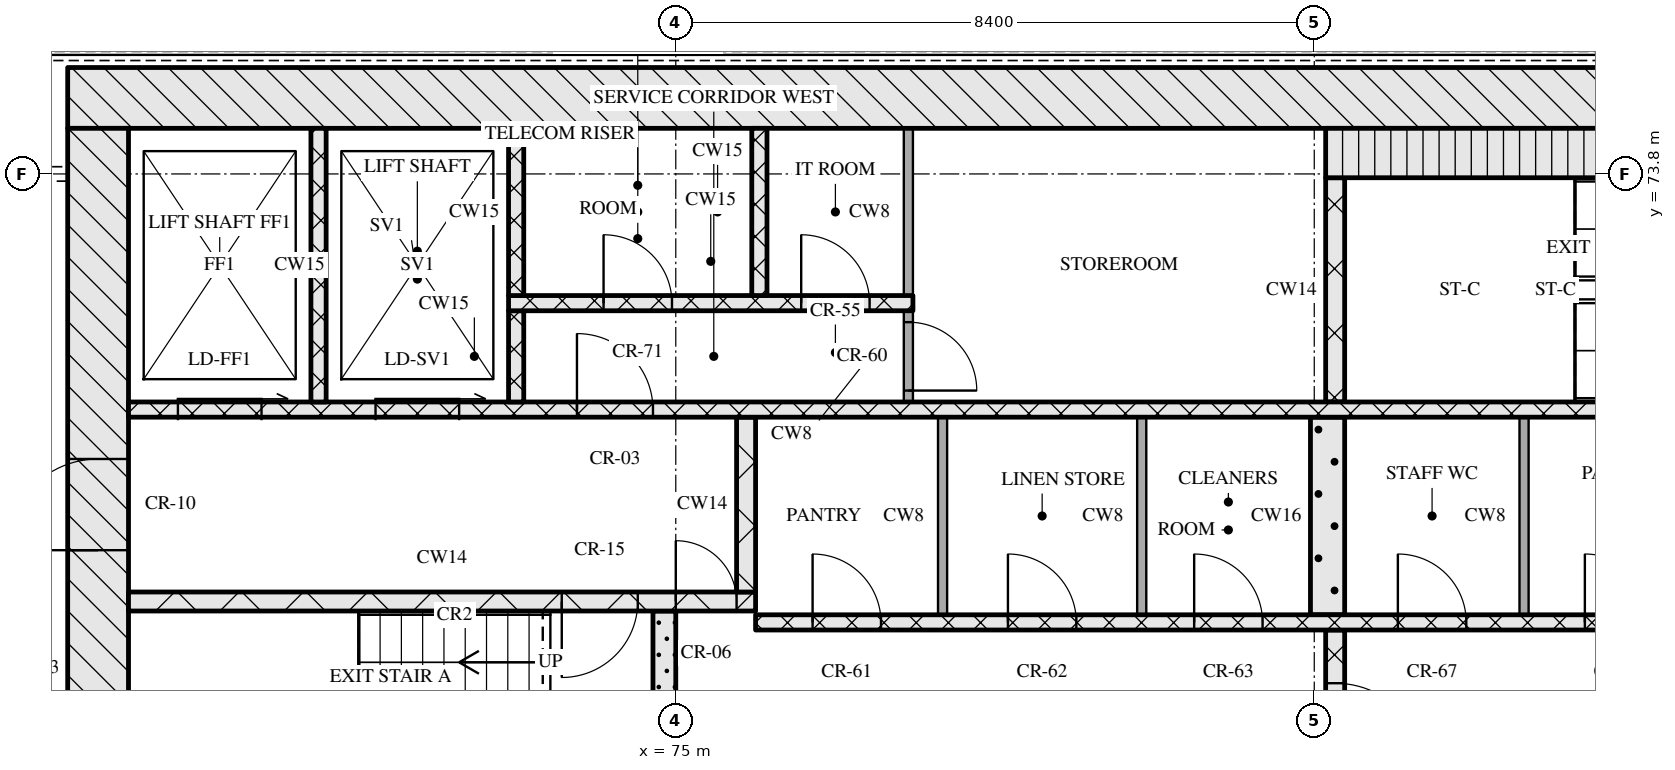
"""IFC4 building model, lengths in metres.
Left out: names, types, materials, properties, quantities, classifications, styles, units other than length and angle.
Written with IfcOpenShell. Run it as: python <this file> out.ifc"""

import sys

from ifc_helpers import new_model, si_unit, direction, frame, frame_2d, origin, place, context, subcontext, project, spatial, rectangle, extrude, element, fill, save


model = new_model("IFC4")
c1 = context("Model", 3, precision=1e-05, world=origin(), true_north=direction((0.0, 1.0)))
c2 = subcontext(c1, "Body", "Model", "MODEL_VIEW")
j1 = project(units=[si_unit("LENGTHUNIT", "METRE"), si_unit("PLANEANGLEUNIT", "RADIAN")], contexts=[c1])
p1 = place(None, origin())
s1 = spatial("IfcSite", under=j1, at=p1, CompositionType="ELEMENT")
p2 = place(p1, origin())
s2 = spatial("IfcBuilding", under=s1, at=p2, CompositionType="ELEMENT")
p3 = place(p2, frame((0.0, 0.0, 183.45)))
s3 = spatial("IfcBuildingStorey", under=s2, at=p3, CompositionType="ELEMENT", Elevation=183.45)
p4 = place(p3, frame((67.0, 74.8, 0.0), z_axis=(0.0, 0.0, 1.0), x_axis=(1.0, 0.0, 0.0)))
e1 = element("IfcWall", 1, at=p4, inside=s3, PredefinedType="SOLIDWALL", context=c2, shape_type="SweptSolid", body=[
    extrude(rectangle(XDim=41.2, YDim=0.8, at=frame_2d((20.6, 0.0))), origin(), (0.0, 0.0, 1.0), 3.32),
])
p5 = place(p3, frame((67.4, 62.4, 0.0), z_axis=(0.0, 0.0, 1.0), x_axis=(0.0, 1.0, 0.0)))
e2 = element("IfcWall", 2, at=p5, inside=s3, PredefinedType="SOLIDWALL", context=c2, shape_type="SweptSolid", body=[
    extrude(rectangle(XDim=12.0, YDim=0.8, at=frame_2d((6.0, 0.0))), origin(), (0.0, 0.0, 1.0), 3.32),
])
p6 = place(p5, frame((6.45, 0.0, 0.0)))
e3 = element("IfcOpeningElement", 3, at=p6, cuts=e2, PredefinedType="OPENING", context=c2, shape_type="SweptSolid", body=[
    extrude(rectangle(XDim=1.2, YDim=2.1, at=frame_2d((0.6, 1.05))), frame((0.0, 0.41, 0.0), z_axis=(0.0, -1.0, 0.0), x_axis=(1.0, 0.0, 0.0)), (0.0, 0.0, 1.0), 0.82),
])
p7 = place(p3, frame((74.85, 65.2, 0.0), z_axis=(0.0, 0.0, 1.0), x_axis=(0.0, 1.0, 0.0)))
e4 = element("IfcWall", 4, at=p7, inside=s3, PredefinedType="SOLIDWALL", context=c2, shape_type="SweptSolid", body=[
    extrude(rectangle(XDim=2.85, YDim=0.3, at=frame_2d((1.425, 0.0))), origin(), (0.0, 0.0, 1.0), 3.32),
])
p8 = place(p3, frame((83.675, 65.2, 0.0), z_axis=(0.0, 0.0, 1.0), x_axis=(0.0, 1.0, 0.0)))
e5 = element("IfcWall", 5, at=p8, inside=s3, PredefinedType="SOLIDWALL", context=c2, shape_type="SweptSolid", body=[
    extrude(rectangle(XDim=2.6, YDim=0.25, at=frame_2d((1.3, 0.0))), origin(), (0.0, 0.0, 1.0), 3.32),
])
p9 = place(p8, frame((0.7, 0.0, 0.0)))
e6 = element("IfcOpeningElement", 6, at=p9, cuts=e5, PredefinedType="OPENING", context=c2, shape_type="SweptSolid", body=[
    extrude(rectangle(XDim=1.2, YDim=2.1, at=frame_2d((0.6, 1.05))), frame((0.0, 0.135, 0.0), z_axis=(0.0, -1.0, 0.0), x_axis=(1.0, 0.0, 0.0)), (0.0, 0.0, 1.0), 0.27),
])
p10 = place(p3, frame((76.05, 67.9, 0.0), z_axis=(0.0, 0.0, 1.0), x_axis=(1.0, 0.0, 0.0)))
e7 = element("IfcWall", 7, at=p10, inside=s3, PredefinedType="SOLIDWALL", context=c2, shape_type="SweptSolid", body=[
    extrude(rectangle(XDim=23.1, YDim=0.2, at=frame_2d((11.55, 0.0))), origin(), (0.0, 0.0, 1.0), 3.32),
])
p11 = place(p10, frame((0.75, 0.0, 0.0)))
e8 = element("IfcOpeningElement", 8, at=p11, cuts=e7, PredefinedType="OPENING", context=c2, shape_type="SweptSolid", body=[
    extrude(rectangle(XDim=0.9, YDim=2.1, at=frame_2d((0.45, 1.05))), frame((0.0, 0.11, 0.0), z_axis=(0.0, -1.0, 0.0), x_axis=(1.0, 0.0, 0.0)), (0.0, 0.0, 1.0), 0.22),
])
p12 = place(p10, frame((3.32, 0.0, 0.0)))
e9 = element("IfcOpeningElement", 9, at=p12, cuts=e7, PredefinedType="OPENING", context=c2, shape_type="SweptSolid", body=[
    extrude(rectangle(XDim=0.9, YDim=2.1, at=frame_2d((0.45, 1.05))), frame((0.0, 0.11, 0.0), z_axis=(0.0, -1.0, 0.0), x_axis=(1.0, 0.0, 0.0)), (0.0, 0.0, 1.0), 0.22),
])
p13 = place(p10, frame((5.77, 0.0, 0.0)))
e10 = element("IfcOpeningElement", 10, at=p13, cuts=e7, PredefinedType="OPENING", context=c2, shape_type="SweptSolid", body=[
    extrude(rectangle(XDim=0.9, YDim=2.1, at=frame_2d((0.45, 1.05))), frame((0.0, 0.11, 0.0), z_axis=(0.0, -1.0, 0.0), x_axis=(1.0, 0.0, 0.0)), (0.0, 0.0, 1.0), 0.22),
])
p14 = place(p10, frame((8.45, 0.0, 0.0)))
e11 = element("IfcOpeningElement", 11, at=p14, cuts=e7, PredefinedType="OPENING", context=c2, shape_type="SweptSolid", body=[
    extrude(rectangle(XDim=0.9, YDim=2.1, at=frame_2d((0.45, 1.05))), frame((0.0, 0.11, 0.0), z_axis=(0.0, -1.0, 0.0), x_axis=(1.0, 0.0, 0.0)), (0.0, 0.0, 1.0), 0.22),
])
p15 = place(p10, frame((10.91, 0.0, 0.0)))
e12 = element("IfcOpeningElement", 12, at=p15, cuts=e7, PredefinedType="OPENING", context=c2, shape_type="SweptSolid", body=[
    extrude(rectangle(XDim=0.9, YDim=2.1, at=frame_2d((0.45, 1.05))), frame((0.0, 0.11, 0.0), z_axis=(0.0, -1.0, 0.0), x_axis=(1.0, 0.0, 0.0)), (0.0, 0.0, 1.0), 0.22),
])
p16 = place(p10, frame((13.55, 0.0, 0.0)))
e13 = element("IfcOpeningElement", 13, at=p16, cuts=e7, PredefinedType="OPENING", context=c2, shape_type="SweptSolid", body=[
    extrude(rectangle(XDim=1.0, YDim=2.1, at=frame_2d((0.5, 1.05))), frame((0.0, 0.11, 0.0), z_axis=(0.0, -1.0, 0.0), x_axis=(1.0, 0.0, 0.0)), (0.0, 0.0, 1.0), 0.22),
])
p17 = place(p10, frame((16.2, 0.0, 0.0)))
e14 = element("IfcOpeningElement", 14, at=p17, cuts=e7, PredefinedType="OPENING", context=c2, shape_type="SweptSolid", body=[
    extrude(rectangle(XDim=1.1, YDim=2.1, at=frame_2d((0.55, 1.05))), frame((0.0, 0.11, 0.0), z_axis=(0.0, -1.0, 0.0), x_axis=(1.0, 0.0, 0.0)), (0.0, 0.0, 1.0), 0.22),
])
p18 = place(p10, frame((18.7, 0.0, 0.0)))
e15 = element("IfcOpeningElement", 15, at=p18, cuts=e7, PredefinedType="OPENING", context=c2, shape_type="SweptSolid", body=[
    extrude(rectangle(XDim=1.1, YDim=2.1, at=frame_2d((0.55, 1.05))), frame((0.0, 0.11, 0.0), z_axis=(0.0, -1.0, 0.0), x_axis=(1.0, 0.0, 0.0)), (0.0, 0.0, 1.0), 0.22),
])
p19 = place(p10, frame((21.2, 0.0, 0.0)))
e16 = element("IfcOpeningElement", 16, at=p19, cuts=e7, PredefinedType="OPENING", context=c2, shape_type="SweptSolid", body=[
    extrude(rectangle(XDim=1.1, YDim=2.1, at=frame_2d((0.55, 1.05))), frame((0.0, 0.11, 0.0), z_axis=(0.0, -1.0, 0.0), x_axis=(1.0, 0.0, 0.0)), (0.0, 0.0, 1.0), 0.22),
])
for number, where, z_axis, x_axis in (
    (17, (78.51, 68.0, 0.0), (0.0, 0.0, 1.0), (0.0, 1.0, 0.0)),
    (18, (81.13, 68.0, 0.0), (0.0, 0.0, 1.0), (0.0, 1.0, 0.0)),
):
    element("IfcWall", number, at=place(p3, frame(where, z_axis=z_axis, x_axis=x_axis)), inside=s3, PredefinedType="PARTITIONING", context=c2, shape_type="SweptSolid", body=[
        extrude(rectangle(XDim=2.6, YDim=0.12, at=frame_2d((1.3, 0.0))), origin(), (0.0, 0.0, 1.0), 3.32),
    ])
p20 = place(p3, frame((83.575, 68.0, 0.0), z_axis=(0.0, 0.0, 1.0), x_axis=(0.0, 1.0, 0.0)))
e19 = element("IfcWall", 19, at=p20, inside=s3, PredefinedType="SOLIDWALL", context=c2, shape_type="SweptSolid", body=[
    extrude(rectangle(XDim=2.6, YDim=0.45, at=frame_2d((1.3, 0.0))), origin(), (0.0, 0.0, 1.0), 3.32),
])
p21 = place(p3, frame((86.16, 68.0, 0.0), z_axis=(0.0, 0.0, 1.0), x_axis=(0.0, 1.0, 0.0)))
e20 = element("IfcWall", 20, at=p21, inside=s3, PredefinedType="PARTITIONING", context=c2, shape_type="SweptSolid", body=[
    extrude(rectangle(XDim=2.6, YDim=0.12, at=frame_2d((1.3, 0.0))), origin(), (0.0, 0.0, 1.0), 3.32),
])
p22 = place(p3, frame((67.8, 68.175, 0.0), z_axis=(0.0, 0.0, 1.0), x_axis=(1.0, 0.0, 0.0)))
e21 = element("IfcWall", 21, at=p22, inside=s3, PredefinedType="SOLIDWALL", context=c2, shape_type="SweptSolid", body=[
    extrude(rectangle(XDim=8.25, YDim=0.25, at=frame_2d((4.125, 0.0))), origin(), (0.0, 0.0, 1.0), 3.32),
])
p23 = place(p22, frame((5.7, 0.0, 0.0)))
e22 = element("IfcOpeningElement", 22, at=p23, cuts=e21, PredefinedType="OPENING", context=c2, shape_type="SweptSolid", body=[
    extrude(rectangle(XDim=1.0, YDim=2.1, at=frame_2d((0.5, 1.05))), frame((0.0, 0.135, 0.0), z_axis=(0.0, -1.0, 0.0), x_axis=(1.0, 0.0, 0.0)), (0.0, 0.0, 1.0), 0.27),
])
p24 = place(p22, frame((7.2, 0.0, 0.0)))
e23 = element("IfcOpeningElement", 23, at=p24, cuts=e21, PredefinedType="OPENING", context=c2, shape_type="SweptSolid", body=[
    extrude(rectangle(XDim=0.8, YDim=2.1, at=frame_2d((0.4, 1.05))), frame((0.0, 0.135, 0.0), z_axis=(0.0, -1.0, 0.0), x_axis=(1.0, 0.0, 0.0)), (0.0, 0.0, 1.0), 0.27),
])
p25 = place(p3, frame((75.925, 68.3, 0.0), z_axis=(0.0, 0.0, 1.0), x_axis=(0.0, 1.0, 0.0)))
e24 = element("IfcWall", 24, at=p25, inside=s3, PredefinedType="SOLIDWALL", context=c2, shape_type="SweptSolid", body=[
    extrude(rectangle(XDim=2.3, YDim=0.25, at=frame_2d((1.15, 0.0))), origin(), (0.0, 0.0, 1.0), 3.32),
])
p26 = place(p3, frame((67.8, 70.7, 0.0), z_axis=(0.0, 0.0, 1.0), x_axis=(1.0, 0.0, 0.0)))
e25 = element("IfcWall", 25, at=p26, inside=s3, PredefinedType="SOLIDWALL", context=c2, shape_type="SweptSolid", body=[
    extrude(rectangle(XDim=39.6, YDim=0.2, at=frame_2d((19.8, 0.0))), origin(), (0.0, 0.0, 1.0), 3.32),
])
p27 = place(p26, frame((0.65, 0.0, 0.0)))
e26 = element("IfcOpeningElement", 26, at=p27, cuts=e25, PredefinedType="OPENING", context=c2, shape_type="SweptSolid", body=[
    extrude(rectangle(XDim=1.1, YDim=2.1, at=frame_2d((0.55, 1.05))), frame((0.0, 0.11, 0.0), z_axis=(0.0, -1.0, 0.0), x_axis=(1.0, 0.0, 0.0)), (0.0, 0.0, 1.0), 0.22),
])
p28 = place(p26, frame((3.25, 0.0, 0.0)))
e27 = element("IfcOpeningElement", 27, at=p28, cuts=e25, PredefinedType="OPENING", context=c2, shape_type="SweptSolid", body=[
    extrude(rectangle(XDim=1.1, YDim=2.1, at=frame_2d((0.55, 1.05))), frame((0.0, 0.11, 0.0), z_axis=(0.0, -1.0, 0.0), x_axis=(1.0, 0.0, 0.0)), (0.0, 0.0, 1.0), 0.22),
])
p29 = place(p26, frame((5.9, 0.0, 0.0)))
e28 = element("IfcOpeningElement", 28, at=p29, cuts=e25, PredefinedType="OPENING", context=c2, shape_type="SweptSolid", body=[
    extrude(rectangle(XDim=1.0, YDim=2.1, at=frame_2d((0.5, 1.05))), frame((0.0, 0.11, 0.0), z_axis=(0.0, -1.0, 0.0), x_axis=(1.0, 0.0, 0.0)), (0.0, 0.0, 1.0), 0.22),
])
p30 = place(p26, frame((21.7, 0.0, 0.0)))
e29 = element("IfcOpeningElement", 29, at=p30, cuts=e25, PredefinedType="OPENING", context=c2, shape_type="SweptSolid", body=[
    extrude(rectangle(XDim=1.0, YDim=2.1, at=frame_2d((0.5, 1.05))), frame((0.0, 0.11, 0.0), z_axis=(0.0, -1.0, 0.0), x_axis=(1.0, 0.0, 0.0)), (0.0, 0.0, 1.0), 0.22),
])
p31 = place(p26, frame((32.7, 0.0, 0.0)))
e30 = element("IfcOpeningElement", 30, at=p31, cuts=e25, PredefinedType="OPENING", context=c2, shape_type="SweptSolid", body=[
    extrude(rectangle(XDim=1.0, YDim=2.1, at=frame_2d((0.5, 1.05))), frame((0.0, 0.11, 0.0), z_axis=(0.0, -1.0, 0.0), x_axis=(1.0, 0.0, 0.0)), (0.0, 0.0, 1.0), 0.22),
])
p32 = place(p26, frame((35.25, 0.0, 0.0)))
e31 = element("IfcOpeningElement", 31, at=p32, cuts=e25, PredefinedType="OPENING", context=c2, shape_type="SweptSolid", body=[
    extrude(rectangle(XDim=1.1, YDim=2.1, at=frame_2d((0.55, 1.05))), frame((0.0, 0.11, 0.0), z_axis=(0.0, -1.0, 0.0), x_axis=(1.0, 0.0, 0.0)), (0.0, 0.0, 1.0), 0.22),
])
p33 = place(p26, frame((37.85, 0.0, 0.0)))
e32 = element("IfcOpeningElement", 32, at=p33, cuts=e25, PredefinedType="OPENING", context=c2, shape_type="SweptSolid", body=[
    extrude(rectangle(XDim=1.1, YDim=2.1, at=frame_2d((0.55, 1.05))), frame((0.0, 0.11, 0.0), z_axis=(0.0, -1.0, 0.0), x_axis=(1.0, 0.0, 0.0)), (0.0, 0.0, 1.0), 0.22),
])
p34 = place(p3, frame((70.3, 70.8, 0.0), z_axis=(0.0, 0.0, 1.0), x_axis=(0.0, 1.0, 0.0)))
e33 = element("IfcWall", 33, at=p34, inside=s3, PredefinedType="SOLIDWALL", context=c2, shape_type="SweptSolid", body=[
    extrude(rectangle(XDim=3.6, YDim=0.2, at=frame_2d((1.8, 0.0))), origin(), (0.0, 0.0, 1.0), 3.32),
])
p35 = place(p3, frame((72.9, 70.8, 0.0), z_axis=(0.0, 0.0, 1.0), x_axis=(0.0, 1.0, 0.0)))
e34 = element("IfcWall", 34, at=p35, inside=s3, PredefinedType="SOLIDWALL", context=c2, shape_type="SweptSolid", body=[
    extrude(rectangle(XDim=1.2, YDim=0.2, at=frame_2d((0.6, 0.0))), origin(), (0.0, 0.0, 1.0), 3.32),
])
p36 = place(p3, frame((78.06, 70.8, 0.0), z_axis=(0.0, 0.0, 1.0), x_axis=(0.0, 1.0, 0.0)))
e35 = element("IfcWall", 35, at=p36, inside=s3, PredefinedType="PARTITIONING", context=c2, shape_type="SweptSolid", body=[
    extrude(rectangle(XDim=1.2, YDim=0.12, at=frame_2d((0.6, 0.0))), origin(), (0.0, 0.0, 1.0), 3.32),
])
p37 = place(p36, frame((0.15, 0.0, 0.0)))
e36 = element("IfcOpeningElement", 36, at=p37, cuts=e35, PredefinedType="OPENING", context=c2, shape_type="SweptSolid", body=[
    extrude(rectangle(XDim=0.9, YDim=2.1, at=frame_2d((0.45, 1.05))), frame((0.0, 0.07, 0.0), z_axis=(0.0, -1.0, 0.0), x_axis=(1.0, 0.0, 0.0)), (0.0, 0.0, 1.0), 0.14),
])
p38 = place(p3, frame((83.675, 70.8, 0.0), z_axis=(0.0, 0.0, 1.0), x_axis=(0.0, 1.0, 0.0)))
e37 = element("IfcWall", 37, at=p38, inside=s3, PredefinedType="SOLIDWALL", context=c2, shape_type="SweptSolid", body=[
    extrude(rectangle(XDim=2.95, YDim=0.25, at=frame_2d((1.475, 0.0))), origin(), (0.0, 0.0, 1.0), 3.32),
])
p39 = place(p3, frame((72.8, 72.1, 0.0), z_axis=(0.0, 0.0, 1.0), x_axis=(1.0, 0.0, 0.0)))
e38 = element("IfcWall", 38, at=p39, inside=s3, PredefinedType="SOLIDWALL", context=c2, shape_type="SweptSolid", body=[
    extrude(rectangle(XDim=5.32, YDim=0.2, at=frame_2d((2.66, 0.0))), origin(), (0.0, 0.0, 1.0), 3.32),
])
p40 = place(p39, frame((1.25, 0.0, 0.0)))
e39 = element("IfcOpeningElement", 39, at=p40, cuts=e38, PredefinedType="OPENING", context=c2, shape_type="SweptSolid", body=[
    extrude(rectangle(XDim=0.9, YDim=2.1, at=frame_2d((0.45, 1.05))), frame((0.0, 0.11, 0.0), z_axis=(0.0, -1.0, 0.0), x_axis=(1.0, 0.0, 0.0)), (0.0, 0.0, 1.0), 0.22),
])
p41 = place(p39, frame((3.85, 0.0, 0.0)))
e40 = element("IfcOpeningElement", 40, at=p41, cuts=e38, PredefinedType="OPENING", context=c2, shape_type="SweptSolid", body=[
    extrude(rectangle(XDim=0.9, YDim=2.1, at=frame_2d((0.45, 1.05))), frame((0.0, 0.11, 0.0), z_axis=(0.0, -1.0, 0.0), x_axis=(1.0, 0.0, 0.0)), (0.0, 0.0, 1.0), 0.22),
])
for number, where, z_axis, x_axis in (
    (41, (72.9, 72.2, 0.0), (0.0, 0.0, 1.0), (0.0, 1.0, 0.0)),
    (42, (76.1, 72.2, 0.0), (0.0, 0.0, 1.0), (0.0, 1.0, 0.0)),
):
    element("IfcWall", number, at=place(p3, frame(where, z_axis=z_axis, x_axis=x_axis)), inside=s3, PredefinedType="SOLIDWALL", context=c2, shape_type="SweptSolid", body=[
        extrude(rectangle(XDim=2.2, YDim=0.2, at=frame_2d((1.1, 0.0))), origin(), (0.0, 0.0, 1.0), 3.32),
    ])
p42 = place(p3, frame((78.06, 72.2, 0.0), z_axis=(0.0, 0.0, 1.0), x_axis=(0.0, 1.0, 0.0)))
e43 = element("IfcWall", 43, at=p42, inside=s3, PredefinedType="PARTITIONING", context=c2, shape_type="SweptSolid", body=[
    extrude(rectangle(XDim=2.2, YDim=0.12, at=frame_2d((1.1, 0.0))), origin(), (0.0, 0.0, 1.0), 3.32),
])
p43 = place(p3, frame((83.55, 74.075, 0.0), z_axis=(0.0, 0.0, 1.0), x_axis=(1.0, 0.0, 0.0)))
e44 = element("IfcWall", 44, at=p43, inside=s3, PredefinedType="SOLIDWALL", context=c2, shape_type="SweptSolid", body=[
    extrude(rectangle(XDim=8.1, YDim=0.65, at=frame_2d((4.05, 0.0))), origin(), (0.0, 0.0, 1.0), 3.32),
])
p44 = place(p9, origin())
e45 = element("IfcDoor", 45, at=p44, inside=s3, OperationType="SINGLE_SWING_RIGHT", PredefinedType="DOOR", context=c2, shape_type="SweptSolid", body=[
    extrude(rectangle(XDim=1.2, YDim=2.1, at=frame_2d((0.6, 1.05))), frame((0.0, 0.025, 0.0), z_axis=(0.0, -1.0, 0.0), x_axis=(1.0, 0.0, 0.0)), (0.0, 0.0, 1.0), 0.05),
])
fill(e6, e45)
p45 = place(p11, origin())
e46 = element("IfcDoor", 46, at=p45, inside=s3, OperationType="SINGLE_SWING_LEFT", PredefinedType="DOOR", context=c2, shape_type="SweptSolid", body=[
    extrude(rectangle(XDim=0.9, YDim=2.1, at=frame_2d((0.45, 1.05))), frame((0.0, 0.025, 0.0), z_axis=(0.0, -1.0, 0.0), x_axis=(1.0, 0.0, 0.0)), (0.0, 0.0, 1.0), 0.05),
])
fill(e8, e46)
p46 = place(p12, origin())
e47 = element("IfcDoor", 47, at=p46, inside=s3, OperationType="SINGLE_SWING_LEFT", PredefinedType="DOOR", context=c2, shape_type="SweptSolid", body=[
    extrude(rectangle(XDim=0.9, YDim=2.1, at=frame_2d((0.45, 1.05))), frame((0.0, 0.025, 0.0), z_axis=(0.0, -1.0, 0.0), x_axis=(1.0, 0.0, 0.0)), (0.0, 0.0, 1.0), 0.05),
])
fill(e9, e47)
p47 = place(p13, origin())
e48 = element("IfcDoor", 48, at=p47, inside=s3, OperationType="SINGLE_SWING_LEFT", PredefinedType="DOOR", context=c2, shape_type="SweptSolid", body=[
    extrude(rectangle(XDim=0.9, YDim=2.1, at=frame_2d((0.45, 1.05))), frame((0.0, 0.025, 0.0), z_axis=(0.0, -1.0, 0.0), x_axis=(1.0, 0.0, 0.0)), (0.0, 0.0, 1.0), 0.05),
])
fill(e10, e48)
p48 = place(p14, origin())
e49 = element("IfcDoor", 49, at=p48, inside=s3, OperationType="SINGLE_SWING_LEFT", PredefinedType="DOOR", context=c2, shape_type="SweptSolid", body=[
    extrude(rectangle(XDim=0.9, YDim=2.1, at=frame_2d((0.45, 1.05))), frame((0.0, 0.025, 0.0), z_axis=(0.0, -1.0, 0.0), x_axis=(1.0, 0.0, 0.0)), (0.0, 0.0, 1.0), 0.05),
])
fill(e11, e49)
p49 = place(p15, origin())
e50 = element("IfcDoor", 50, at=p49, inside=s3, OperationType="SINGLE_SWING_LEFT", PredefinedType="DOOR", context=c2, shape_type="SweptSolid", body=[
    extrude(rectangle(XDim=0.9, YDim=2.1, at=frame_2d((0.45, 1.05))), frame((0.0, 0.025, 0.0), z_axis=(0.0, -1.0, 0.0), x_axis=(1.0, 0.0, 0.0)), (0.0, 0.0, 1.0), 0.05),
])
fill(e12, e50)
p50 = place(p23, origin())
e51 = element("IfcDoor", 51, at=p50, inside=s3, OperationType="SINGLE_SWING_RIGHT", PredefinedType="DOOR", context=c2, shape_type="SweptSolid", body=[
    extrude(rectangle(XDim=1.0, YDim=2.1, at=frame_2d((0.5, 1.05))), frame((0.0, 0.025, 0.0), z_axis=(0.0, -1.0, 0.0), x_axis=(1.0, 0.0, 0.0)), (0.0, 0.0, 1.0), 0.05),
])
fill(e22, e51)
p51 = place(p24, origin())
e52 = element("IfcDoor", 52, at=p51, inside=s3, OperationType="SINGLE_SWING_LEFT", PredefinedType="DOOR", context=c2, shape_type="SweptSolid", body=[
    extrude(rectangle(XDim=0.8, YDim=2.1, at=frame_2d((0.4, 1.05))), frame((0.0, 0.025, 0.0), z_axis=(0.0, -1.0, 0.0), x_axis=(1.0, 0.0, 0.0)), (0.0, 0.0, 1.0), 0.05),
])
fill(e23, e52)
p52 = place(p6, origin())
e53 = element("IfcDoor", 53, at=p52, inside=s3, OperationType="SINGLE_SWING_LEFT", PredefinedType="DOOR", context=c2, shape_type="SweptSolid", body=[
    extrude(rectangle(XDim=1.2, YDim=2.1, at=frame_2d((0.6, 1.05))), frame((0.0, 0.025, 0.0), z_axis=(0.0, -1.0, 0.0), x_axis=(1.0, 0.0, 0.0)), (0.0, 0.0, 1.0), 0.05),
])
fill(e3, e53)
p53 = place(p27, origin())
e54 = element("IfcDoor", 54, at=p53, inside=s3, OperationType="SLIDING_TO_RIGHT", PredefinedType="DOOR", context=c2, shape_type="SweptSolid", body=[
    extrude(rectangle(XDim=1.1, YDim=2.1, at=frame_2d((0.55, 1.05))), frame((0.0, 0.025, 0.0), z_axis=(0.0, -1.0, 0.0), x_axis=(1.0, 0.0, 0.0)), (0.0, 0.0, 1.0), 0.05),
])
fill(e26, e54)
p54 = place(p28, origin())
e55 = element("IfcDoor", 55, at=p54, inside=s3, OperationType="SLIDING_TO_RIGHT", PredefinedType="DOOR", context=c2, shape_type="SweptSolid", body=[
    extrude(rectangle(XDim=1.1, YDim=2.1, at=frame_2d((0.55, 1.05))), frame((0.0, 0.025, 0.0), z_axis=(0.0, -1.0, 0.0), x_axis=(1.0, 0.0, 0.0)), (0.0, 0.0, 1.0), 0.05),
])
fill(e27, e55)
p55 = place(p29, origin())
e56 = element("IfcDoor", 56, at=p55, inside=s3, OperationType="SINGLE_SWING_LEFT", PredefinedType="DOOR", context=c2, shape_type="SweptSolid", body=[
    extrude(rectangle(XDim=1.0, YDim=2.1, at=frame_2d((0.5, 1.05))), frame((0.0, 0.025, 0.0), z_axis=(0.0, -1.0, 0.0), x_axis=(1.0, 0.0, 0.0)), (0.0, 0.0, 1.0), 0.05),
])
fill(e28, e56)
p56 = place(p37, origin())
e57 = element("IfcDoor", 57, at=p56, inside=s3, OperationType="SINGLE_SWING_RIGHT", PredefinedType="DOOR", context=c2, shape_type="SweptSolid", body=[
    extrude(rectangle(XDim=0.9, YDim=2.1, at=frame_2d((0.45, 1.05))), frame((0.0, 0.025, 0.0), z_axis=(0.0, -1.0, 0.0), x_axis=(1.0, 0.0, 0.0)), (0.0, 0.0, 1.0), 0.05),
])
fill(e36, e57)
p57 = place(p40, origin())
e58 = element("IfcDoor", 58, at=p57, inside=s3, OperationType="SINGLE_SWING_LEFT", PredefinedType="DOOR", context=c2, shape_type="SweptSolid", body=[
    extrude(rectangle(XDim=0.9, YDim=2.1, at=frame_2d((0.45, 1.05))), frame((0.0, 0.025, 0.0), z_axis=(0.0, -1.0, 0.0), x_axis=(1.0, 0.0, 0.0)), (0.0, 0.0, 1.0), 0.05),
])
fill(e39, e58)
p58 = place(p41, origin())
e59 = element("IfcDoor", 59, at=p58, inside=s3, OperationType="SINGLE_SWING_LEFT", PredefinedType="DOOR", context=c2, shape_type="SweptSolid", body=[
    extrude(rectangle(XDim=0.9, YDim=2.1, at=frame_2d((0.45, 1.05))), frame((0.0, 0.025, 0.0), z_axis=(0.0, -1.0, 0.0), x_axis=(1.0, 0.0, 0.0)), (0.0, 0.0, 1.0), 0.05),
])
fill(e40, e59)
save(model, sys.argv[1])
